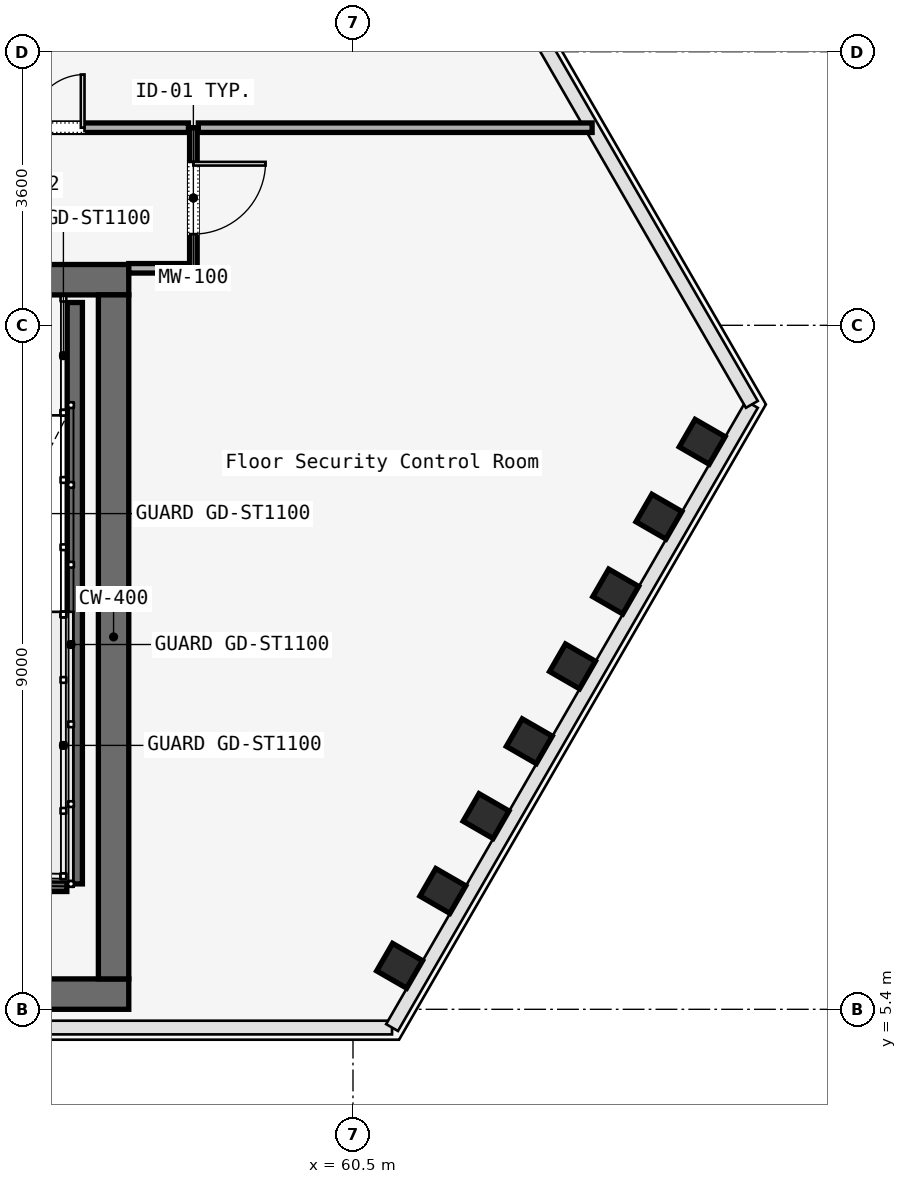
"""IFC4 building model, lengths in metres.
Left out: names, types, materials, properties, quantities, classifications, styles, units other than length and angle.
Written with IfcOpenShell. Run it as: python <this file> out.ifc"""

import sys

from ifc_helpers import new_model, si_unit, direction, frame, frame_2d, origin, origin_2d, place, context, subcontext, project, spatial, rectangle, i_section, extrude, element, fill, save


model = new_model("IFC4")
c1 = context("Model", 3, precision=1e-05, world=origin(), true_north=direction((0.0, 1.0)))
c2 = subcontext(c1, "Body", "Model", "MODEL_VIEW")
j1 = project(units=[si_unit("LENGTHUNIT", "METRE"), si_unit("PLANEANGLEUNIT", "RADIAN")], contexts=[c1])
p1 = place(None, origin())
s1 = spatial("IfcSite", under=j1, at=p1, CompositionType="ELEMENT")
p2 = place(p1, origin())
s2 = spatial("IfcBuilding", under=s1, at=p2, CompositionType="ELEMENT")
p3 = place(p2, frame((0.0, 0.0, 184.0)))
s3 = spatial("IfcBuildingStorey", under=s2, at=p3, CompositionType="ELEMENT", Elevation=184.0)
p4 = place(p3, frame((26.45, 15.0, 0.0), z_axis=(0.0, 0.0, 1.0), x_axis=(1.0, 0.0, 0.0)))
e1 = element("IfcWall", 1, at=p4, inside=s3, PredefinedType="SOLIDWALL", context=c2, shape_type="SweptSolid", body=[
    extrude(rectangle(XDim=31.1, YDim=0.4, at=frame_2d((15.55, 0.0))), origin(), (0.0, 0.0, 1.0), 3.58),
])
p5 = place(p4, frame((1.65, 0.0, 0.0)))
e2 = element("IfcOpeningElement", 2, at=p5, cuts=e1, PredefinedType="OPENING", context=c2, shape_type="SweptSolid", body=[
    extrude(rectangle(XDim=1.1, YDim=2.2, at=frame_2d((0.55, 1.1))), frame((0.0, 0.2, 0.0), z_axis=(0.0, -1.0, 0.0), x_axis=(1.0, 0.0, 0.0)), (0.0, 0.0, 1.0), 0.4),
])
p6 = place(p4, frame((13.65, 0.0, 0.0)))
e3 = element("IfcOpeningElement", 3, at=p6, cuts=e1, PredefinedType="OPENING", context=c2, shape_type="SweptSolid", body=[
    extrude(rectangle(XDim=1.1, YDim=2.2, at=frame_2d((0.55, 1.1))), frame((0.0, 0.2, 0.0), z_axis=(0.0, -1.0, 0.0), x_axis=(1.0, 0.0, 0.0)), (0.0, 0.0, 1.0), 0.4),
])
p7 = place(p4, frame((25.55, 0.0, 0.0)))
e4 = element("IfcOpeningElement", 4, at=p7, cuts=e1, PredefinedType="OPENING", context=c2, shape_type="SweptSolid", body=[
    extrude(rectangle(XDim=1.1, YDim=2.2, at=frame_2d((0.55, 1.1))), frame((0.0, 0.2, 0.0), z_axis=(0.0, -1.0, 0.0), x_axis=(1.0, 0.0, 0.0)), (0.0, 0.0, 1.0), 0.4),
])
p8 = place(p4, frame((10.7, 0.0, 0.0)))
e5 = element("IfcOpeningElement", 5, at=p8, cuts=e1, PredefinedType="OPENING", context=c2, shape_type="SweptSolid", body=[
    extrude(rectangle(XDim=1.4, YDim=2.2, at=frame_2d((0.7, 1.1))), frame((0.0, 0.2, 0.0), z_axis=(0.0, -1.0, 0.0), x_axis=(1.0, 0.0, 0.0)), (0.0, 0.0, 1.0), 0.4),
])
p9 = place(p4, frame((19.35, 0.0, 0.0)))
e6 = element("IfcOpeningElement", 6, at=p9, cuts=e1, PredefinedType="OPENING", context=c2, shape_type="SweptSolid", body=[
    extrude(rectangle(XDim=1.1, YDim=2.2, at=frame_2d((0.55, 1.1))), frame((0.0, 0.2, 0.0), z_axis=(0.0, -1.0, 0.0), x_axis=(1.0, 0.0, 0.0)), (0.0, 0.0, 1.0), 0.4),
])
p10 = place(p4, frame((21.4, 0.0, 0.0)))
e7 = element("IfcOpeningElement", 7, at=p10, cuts=e1, PredefinedType="OPENING", context=c2, shape_type="SweptSolid", body=[
    extrude(rectangle(XDim=0.9, YDim=2.1, at=frame_2d((0.45, 1.05))), frame((0.0, 0.2, 0.0), z_axis=(0.0, -1.0, 0.0), x_axis=(1.0, 0.0, 0.0)), (0.0, 0.0, 1.0), 0.4),
])
p11 = place(p4, frame((23.35, 0.0, 0.0)))
e8 = element("IfcOpeningElement", 8, at=p11, cuts=e1, PredefinedType="OPENING", context=c2, shape_type="SweptSolid", body=[
    extrude(rectangle(XDim=1.3, YDim=2.3, at=frame_2d((0.65, 1.15))), frame((0.0, 0.2, 0.0), z_axis=(0.0, -1.0, 0.0), x_axis=(1.0, 0.0, 0.0)), (0.0, 0.0, 1.0), 0.4),
])
p12 = place(p3, frame((26.45, 5.6, 0.0), z_axis=(0.0, 0.0, 1.0), x_axis=(1.0, 0.0, 0.0)))
e9 = element("IfcWall", 9, at=p12, inside=s3, PredefinedType="SOLIDWALL", context=c2, shape_type="SweptSolid", body=[
    extrude(rectangle(XDim=31.1, YDim=0.4, at=frame_2d((15.55, 0.0))), origin(), (0.0, 0.0, 1.0), 3.58),
])
p13 = place(p3, frame((57.35, 5.8, 0.0), z_axis=(0.0, 0.0, 1.0), x_axis=(0.0, 1.0, 0.0)))
e10 = element("IfcWall", 10, at=p13, inside=s3, PredefinedType="SOLIDWALL", context=c2, shape_type="SweptSolid", body=[
    extrude(rectangle(XDim=9.0, YDim=0.4, at=frame_2d((4.5, 0.0))), origin(), (0.0, 0.0, 1.0), 3.58),
])
for number, where, z_axis, x_axis in (
    (11, (61.114, 5.972, 0.0), (0.0, 0.0, 1.0), (0.5, 0.866, 0.0)),
    (12, (61.682, 6.958, 0.0), (0.0, 0.0, 1.0), (0.5, 0.866, 0.0)),
    (13, (62.251, 7.942, 0.0), (0.0, 0.0, 1.0), (0.5, 0.866, 0.0)),
    (14, (62.819, 8.927, 0.0), (0.0, 0.0, 1.0), (0.5, 0.866, 0.0)),
    (15, (63.388, 9.912, 0.0), (0.0, 0.0, 1.0), (0.5, 0.866, 0.0)),
    (16, (63.957, 10.897, 0.0), (0.0, 0.0, 1.0), (0.5, 0.866, 0.0)),
    (17, (64.525, 11.882, 0.0), (0.0, 0.0, 1.0), (0.5, 0.866, 0.0)),
    (18, (65.094, 12.867, 0.0), (0.0, 0.0, 1.0), (0.5, 0.866, 0.0)),
):
    element("IfcColumn", number, at=place(p3, frame(where, z_axis=z_axis, x_axis=x_axis)), inside=s3, PredefinedType="COLUMN", context=c2, shape_type="SweptSolid", body=[
        extrude(i_section(OverallWidth=0.418, OverallDepth=0.455, WebThickness=0.042, FlangeThickness=0.052, FilletRadius=0.015, at=origin_2d()), origin(), (0.0, 0.0, 1.0), 3.58),
    ])
p14 = place(p3, frame((56.84, 14.7, 0.0), z_axis=(0.0, 0.0, 1.0), x_axis=(0.0, -1.0, 0.0)))
e19 = element("IfcWall", 19, at=p14, inside=s3, PredefinedType="SOLIDWALL", context=c2, shape_type="SweptSolid", body=[
    extrude(rectangle(XDim=7.65, YDim=0.2, at=frame_2d((3.825, 0.0))), origin(), (0.0, 0.0, 1.0), 3.8),
])
p15 = place(p3, frame((53.62, 7.05, 0.0), z_axis=(0.0, 0.0, 1.0), x_axis=(1.0, 0.0, 0.0)))
e20 = element("IfcWall", 20, at=p15, inside=s3, PredefinedType="SOLIDWALL", context=c2, shape_type="SweptSolid", body=[
    extrude(rectangle(XDim=3.115, YDim=0.2, at=frame_2d((1.558, 0.0))), origin(), (0.0, 0.0, 1.0), 3.8),
])
p16 = place(p3, frame((58.4, 17.0, 0.0), z_axis=(0.0, 0.0, 1.0), x_axis=(0.0, -1.0, 0.0)))
e21 = element("IfcWall", 21, at=p16, inside=s3, PredefinedType="MOVABLE", context=c2, shape_type="SweptSolid", body=[
    extrude(rectangle(XDim=1.85, YDim=0.1, at=frame_2d((0.925, 0.0))), origin(), (0.0, 0.0, 1.0), 3.01),
])
p17 = place(p16, frame((0.45, 0.0, 0.0)))
e22 = element("IfcOpeningElement", 22, at=p17, cuts=e21, PredefinedType="OPENING", context=c2, shape_type="SweptSolid", body=[
    extrude(rectangle(XDim=0.95, YDim=2.2, at=frame_2d((0.475, 1.1))), frame((0.0, 0.05, 0.0), z_axis=(0.0, -1.0, 0.0), x_axis=(1.0, 0.0, 0.0)), (0.0, 0.0, 1.0), 0.1),
])
p18 = place(p3, frame((58.335, 15.15, 0.0), z_axis=(0.0, 0.0, 1.0), x_axis=(-1.0, 0.0, 0.0)))
e23 = element("IfcWall", 23, at=p18, inside=s3, PredefinedType="PARTITIONING", context=c2, shape_type="SweptSolid", body=[
    extrude(rectangle(XDim=0.785, YDim=0.125, at=frame_2d((0.393, 0.0))), origin(), (0.0, 0.0, 1.0), 3.01),
])
p19 = place(p3, frame((54.2, 17.0, 0.0), z_axis=(0.0, 0.0, 1.0), x_axis=(1.0, 0.0, 0.0)))
e24 = element("IfcWall", 24, at=p19, inside=s3, PredefinedType="PARTITIONING", context=c2, shape_type="SweptSolid", body=[
    extrude(rectangle(XDim=4.135, YDim=0.125, at=frame_2d((2.067, 0.0))), origin(), (0.0, 0.0, 1.0), 3.01),
])
p20 = place(p19, frame((1.367, 0.0, 0.0)))
e25 = element("IfcOpeningElement", 25, at=p20, cuts=e24, PredefinedType="OPENING", context=c2, shape_type="SweptSolid", body=[
    extrude(rectangle(XDim=1.4, YDim=2.2, at=frame_2d((0.7, 1.1))), frame((0.0, 0.062, 0.0), z_axis=(0.0, -1.0, 0.0), x_axis=(1.0, 0.0, 0.0)), (0.0, 0.0, 1.0), 0.125),
])
p21 = place(p3, frame((58.465, 17.0, 0.0), z_axis=(0.0, 0.0, 1.0), x_axis=(1.0, 0.0, 0.0)))
e26 = element("IfcWall", 26, at=p21, inside=s3, PredefinedType="PARTITIONING", context=c2, shape_type="SweptSolid", body=[
    extrude(rectangle(XDim=5.181, YDim=0.125, at=frame_2d((2.59, 0.0))), origin(), (0.0, 0.0, 1.0), 3.01),
])
p22 = place(p17, origin())
e27 = element("IfcDoor", 27, at=p22, inside=s3, OperationType="SINGLE_SWING_RIGHT", PredefinedType="DOOR", context=c2, shape_type="SweptSolid", body=[
    extrude(rectangle(XDim=0.95, YDim=2.2, at=frame_2d((0.475, 1.1))), frame((0.0, 0.025, 0.0), z_axis=(0.0, -1.0, 0.0), x_axis=(1.0, 0.0, 0.0)), (0.0, 0.0, 1.0), 0.05),
])
fill(e22, e27)
p23 = place(p20, origin())
e28 = element("IfcDoor", 28, at=p23, inside=s3, OperationType="SINGLE_SWING_LEFT", PredefinedType="DOOR", context=c2, shape_type="SweptSolid", body=[
    extrude(rectangle(XDim=1.4, YDim=2.2, at=frame_2d((0.7, 1.1))), frame((0.0, 0.025, 0.0), z_axis=(0.0, -1.0, 0.0), x_axis=(1.0, 0.0, 0.0)), (0.0, 0.0, 1.0), 0.05),
])
fill(e25, e28)
save(model, sys.argv[1])
